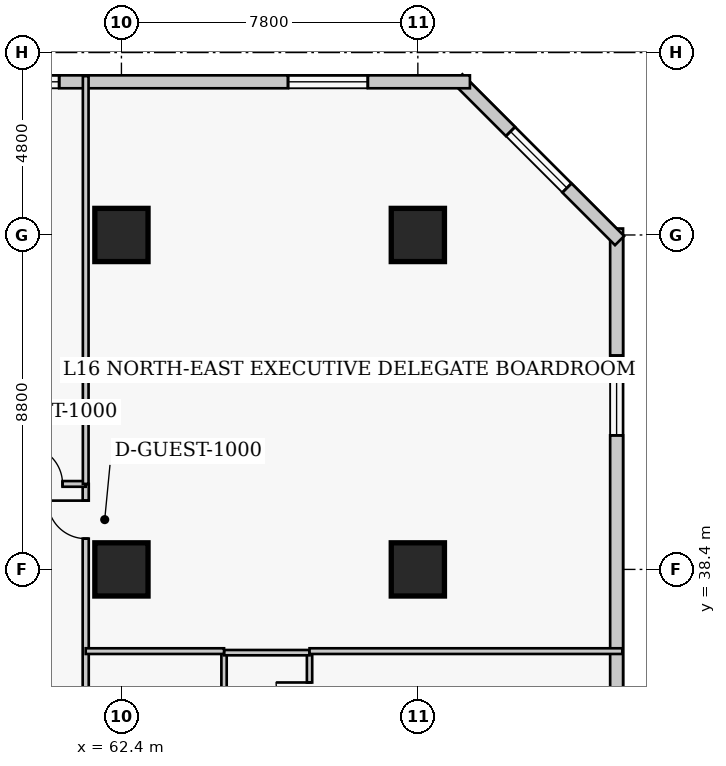
"""IFC4 building model, lengths in metres.
Left out: names, types, materials, properties, quantities, classifications, styles, units other than length and angle.
Written with IfcOpenShell. Run it as: python <this file> out.ifc"""

import sys

from ifc_helpers import new_model, si_unit, direction, frame, frame_2d, origin, origin_2d, place, context, subcontext, project, spatial, rectangle, extrude, element, fill, save


model = new_model("IFC4")
c1 = context("Model", 3, precision=1e-05, world=origin(), true_north=direction((0.0, 1.0)))
c2 = subcontext(c1, "Body", "Model", "MODEL_VIEW")
j1 = project(units=[si_unit("LENGTHUNIT", "METRE"), si_unit("PLANEANGLEUNIT", "RADIAN")], contexts=[c1])
p1 = place(None, origin())
s1 = spatial("IfcSite", under=j1, at=p1, CompositionType="ELEMENT")
p2 = place(p1, origin())
s2 = spatial("IfcBuilding", under=s1, at=p2, CompositionType="ELEMENT")
p3 = place(p2, frame((0.0, 0.0, 67.8)))
s3 = spatial("IfcBuildingStorey", under=s2, at=p3, CompositionType="ELEMENT", Elevation=67.8)
for number, where, z_axis, x_axis in (
    (1, (62.4, 38.4, 0.0), (0.0, 0.0, 1.0), (1.0, 0.0, 0.0)),
    (2, (62.4, 47.2, 0.0), (0.0, 0.0, 1.0), (1.0, 0.0, 0.0)),
    (3, (70.2, 38.4, 0.0), (0.0, 0.0, 1.0), (1.0, 0.0, 0.0)),
    (4, (70.2, 47.2, 0.0), (0.0, 0.0, 1.0), (1.0, 0.0, 0.0)),
):
    element("IfcColumn", number, at=place(p3, frame(where, z_axis=z_axis, x_axis=x_axis)), inside=s3, PredefinedType="COLUMN", context=c2, shape_type="SweptSolid", body=[
        extrude(rectangle(XDim=1.4, YDim=1.4, at=origin_2d()), origin(), (0.0, 0.0, 1.0), 3.8),
    ])
p4 = place(p3, frame((75.43, 12.23, 0.0), z_axis=(0.0, 0.0, 1.0), x_axis=(0.0, 1.0, 0.0)))
e5 = element("IfcWall", 5, at=p4, inside=s3, PredefinedType="SOLIDWALL", context=c2, shape_type="SweptSolid", body=[
    extrude(rectangle(XDim=35.14, YDim=0.34, at=frame_2d((17.57, 0.0))), origin(), (0.0, 0.0, 1.0), 3.54),
])
p5 = place(p4, frame((3.343, 0.0, 0.85)))
e6 = element("IfcOpeningElement", 6, at=p5, cuts=e5, PredefinedType="OPENING", context=c2, shape_type="SweptSolid", body=[
    extrude(rectangle(XDim=2.1, YDim=1.85, at=frame_2d((1.05, 0.925))), frame((0.0, 0.18, 0.0), z_axis=(0.0, -1.0, 0.0), x_axis=(1.0, 0.0, 0.0)), (0.0, 0.0, 1.0), 0.36),
])
p6 = place(p4, frame((12.127, 0.0, 0.85)))
e7 = element("IfcOpeningElement", 7, at=p6, cuts=e5, PredefinedType="OPENING", context=c2, shape_type="SweptSolid", body=[
    extrude(rectangle(XDim=2.1, YDim=1.85, at=frame_2d((1.05, 0.925))), frame((0.0, 0.18, 0.0), z_axis=(0.0, -1.0, 0.0), x_axis=(1.0, 0.0, 0.0)), (0.0, 0.0, 1.0), 0.36),
])
p7 = place(p4, frame((20.913, 0.0, 0.85)))
e8 = element("IfcOpeningElement", 8, at=p7, cuts=e5, PredefinedType="OPENING", context=c2, shape_type="SweptSolid", body=[
    extrude(rectangle(XDim=2.1, YDim=1.85, at=frame_2d((1.05, 0.925))), frame((0.0, 0.18, 0.0), z_axis=(0.0, -1.0, 0.0), x_axis=(1.0, 0.0, 0.0)), (0.0, 0.0, 1.0), 0.36),
])
p8 = place(p4, frame((29.698, 0.0, 0.85)))
e9 = element("IfcOpeningElement", 9, at=p8, cuts=e5, PredefinedType="OPENING", context=c2, shape_type="SweptSolid", body=[
    extrude(rectangle(XDim=2.1, YDim=1.85, at=frame_2d((1.05, 0.925))), frame((0.0, 0.18, 0.0), z_axis=(0.0, -1.0, 0.0), x_axis=(1.0, 0.0, 0.0)), (0.0, 0.0, 1.0), 0.36),
])
p9 = place(p3, frame((75.508, 47.052, 0.0), z_axis=(0.0, 0.0, 1.0), x_axis=(-0.707106781187, 0.707106781187, 0.0)))
e10 = element("IfcWall", 10, at=p9, inside=s3, PredefinedType="SOLIDWALL", context=c2, shape_type="SweptSolid", body=[
    extrude(rectangle(XDim=6.02, YDim=0.34, at=frame_2d((3.01, 0.0))), origin(), (0.0, 0.0, 1.0), 3.54),
])
p10 = place(p9, frame((1.96, 0.0, 0.85)))
e11 = element("IfcOpeningElement", 11, at=p10, cuts=e10, PredefinedType="OPENING", context=c2, shape_type="SweptSolid", body=[
    extrude(rectangle(XDim=2.1, YDim=1.85, at=frame_2d((1.05, 0.925))), frame((0.0, 0.18, 0.0), z_axis=(0.0, -1.0, 0.0), x_axis=(1.0, 0.0, 0.0)), (0.0, 0.0, 1.0), 0.36),
])
p11 = place(p3, frame((71.57, 51.23, 0.0), z_axis=(0.0, 0.0, 1.0), x_axis=(-1.0, 0.0, 0.0)))
e12 = element("IfcWall", 12, at=p11, inside=s3, PredefinedType="SOLIDWALL", context=c2, shape_type="SweptSolid", body=[
    extrude(rectangle(XDim=29.89, YDim=0.34, at=frame_2d((14.945, 0.0))), origin(), (0.0, 0.0, 1.0), 3.54),
])
p12 = place(p11, frame((2.686, 0.0, 0.85)))
e13 = element("IfcOpeningElement", 13, at=p12, cuts=e12, PredefinedType="OPENING", context=c2, shape_type="SweptSolid", body=[
    extrude(rectangle(XDim=2.1, YDim=1.85, at=frame_2d((1.05, 0.925))), frame((0.0, 0.18, 0.0), z_axis=(0.0, -1.0, 0.0), x_axis=(1.0, 0.0, 0.0)), (0.0, 0.0, 1.0), 0.36),
])
p13 = place(p11, frame((10.809, 0.0, 0.85)))
e14 = element("IfcOpeningElement", 14, at=p13, cuts=e12, PredefinedType="OPENING", context=c2, shape_type="SweptSolid", body=[
    extrude(rectangle(XDim=2.1, YDim=1.85, at=frame_2d((1.05, 0.925))), frame((0.0, 0.18, 0.0), z_axis=(0.0, -1.0, 0.0), x_axis=(1.0, 0.0, 0.0)), (0.0, 0.0, 1.0), 0.36),
])
p14 = place(p11, frame((17.631, 0.0, 0.85)))
e15 = element("IfcOpeningElement", 15, at=p14, cuts=e12, PredefinedType="OPENING", context=c2, shape_type="SweptSolid", body=[
    extrude(rectangle(XDim=2.1, YDim=1.85, at=frame_2d((1.05, 0.925))), frame((0.0, 0.18, 0.0), z_axis=(0.0, -1.0, 0.0), x_axis=(1.0, 0.0, 0.0)), (0.0, 0.0, 1.0), 0.36),
])
p15 = place(p11, frame((25.104, 0.0, 0.85)))
e16 = element("IfcOpeningElement", 16, at=p15, cuts=e12, PredefinedType="OPENING", context=c2, shape_type="SweptSolid", body=[
    extrude(rectangle(XDim=2.1, YDim=1.85, at=frame_2d((1.05, 0.925))), frame((0.0, 0.18, 0.0), z_axis=(0.0, -1.0, 0.0), x_axis=(1.0, 0.0, 0.0)), (0.0, 0.0, 1.0), 0.36),
])
p16 = place(p3, frame((61.46, 10.25, 0.0), z_axis=(0.0, 0.0, 1.0), x_axis=(0.0, 1.0, 0.0)))
e17 = element("IfcWall", 17, at=p16, inside=s3, PredefinedType="PARTITIONING", context=c2, shape_type="SweptSolid", body=[
    extrude(rectangle(XDim=30.4, YDim=0.16, at=frame_2d((15.2, 0.0))), origin(), (0.0, 0.0, 1.0), 3.54),
])
p17 = place(p16, frame((4.4, 0.0, 0.0)))
e18 = element("IfcOpeningElement", 18, at=p17, cuts=e17, PredefinedType="OPENING", context=c2, shape_type="SweptSolid", body=[
    extrude(rectangle(XDim=0.95, YDim=2.1, at=frame_2d((0.475, 1.05))), frame((0.0, 0.09, 0.0), z_axis=(0.0, -1.0, 0.0), x_axis=(1.0, 0.0, 0.0)), (0.0, 0.0, 1.0), 0.18),
])
p18 = place(p16, frame((13.337, 0.0, 0.0)))
e19 = element("IfcOpeningElement", 19, at=p18, cuts=e17, PredefinedType="OPENING", context=c2, shape_type="SweptSolid", body=[
    extrude(rectangle(XDim=0.95, YDim=2.1, at=frame_2d((0.475, 1.05))), frame((0.0, 0.09, 0.0), z_axis=(0.0, -1.0, 0.0), x_axis=(1.0, 0.0, 0.0)), (0.0, 0.0, 1.0), 0.18),
])
p19 = place(p16, frame((21.462, 0.0, 0.0)))
e20 = element("IfcOpeningElement", 20, at=p19, cuts=e17, PredefinedType="OPENING", context=c2, shape_type="SweptSolid", body=[
    extrude(rectangle(XDim=0.95, YDim=2.1, at=frame_2d((0.475, 1.05))), frame((0.0, 0.09, 0.0), z_axis=(0.0, -1.0, 0.0), x_axis=(1.0, 0.0, 0.0)), (0.0, 0.0, 1.0), 0.18),
])
p20 = place(p16, frame((28.96, 0.0, 0.0)))
e21 = element("IfcOpeningElement", 21, at=p20, cuts=e17, PredefinedType="OPENING", context=c2, shape_type="SweptSolid", body=[
    extrude(rectangle(XDim=1.0, YDim=2.15, at=frame_2d((0.5, 1.075))), frame((0.0, 0.09, 0.0), z_axis=(0.0, -1.0, 0.0), x_axis=(1.0, 0.0, 0.0)), (0.0, 0.0, 1.0), 0.18),
])
p21 = place(p3, frame((56.8, 40.65, 0.0), z_axis=(0.0, 0.0, 1.0), x_axis=(1.0, 0.0, 0.0)))
e22 = element("IfcWall", 22, at=p21, inside=s3, PredefinedType="PARTITIONING", context=c2, shape_type="SweptSolid", body=[
    extrude(rectangle(XDim=4.66, YDim=0.15, at=frame_2d((2.33, 0.0))), origin(), (0.0, 0.0, 1.0), 3.54),
])
p22 = place(p21, frame((3.05, 0.0, 0.0)))
e23 = element("IfcOpeningElement", 23, at=p22, cuts=e22, PredefinedType="OPENING", context=c2, shape_type="SweptSolid", body=[
    extrude(rectangle(XDim=1.0, YDim=2.15, at=frame_2d((0.5, 1.075))), frame((0.0, 0.085, 0.0), z_axis=(0.0, -1.0, 0.0), x_axis=(1.0, 0.0, 0.0)), (0.0, 0.0, 1.0), 0.17),
])
p23 = place(p3, frame((61.46, 40.65, 0.0), z_axis=(0.0, 0.0, 1.0), x_axis=(0.0, 1.0, 0.0)))
e24 = element("IfcWall", 24, at=p23, inside=s3, PredefinedType="PARTITIONING", context=c2, shape_type="SweptSolid", body=[
    extrude(rectangle(XDim=10.73, YDim=0.15, at=frame_2d((5.365, 0.0))), origin(), (0.0, 0.0, 1.0), 3.54),
])
p24 = place(p3, frame((65.1, 33.76, 0.0), z_axis=(0.0, 0.0, 1.0), x_axis=(0.0, 1.0, 0.0)))
e25 = element("IfcWall", 25, at=p24, inside=s3, PredefinedType="PLUMBINGWALL", context=c2, shape_type="SweptSolid", body=[
    extrude(rectangle(XDim=2.45, YDim=0.14, at=frame_2d((1.225, 0.0))), origin(), (0.0, 0.0, 1.0), 3.54),
])
p25 = place(p3, frame((67.35, 33.76, 0.0), z_axis=(0.0, 0.0, 1.0), x_axis=(0.0, 1.0, 0.0)))
e26 = element("IfcWall", 26, at=p25, inside=s3, PredefinedType="PLUMBINGWALL", context=c2, shape_type="SweptSolid", body=[
    extrude(rectangle(XDim=2.45, YDim=0.14, at=frame_2d((1.225, 0.0))), origin(), (0.0, 0.0, 1.0), 3.54),
])
p26 = place(p25, frame((0.785, 0.0, 0.0)))
e27 = element("IfcOpeningElement", 27, at=p26, cuts=e26, PredefinedType="OPENING", context=c2, shape_type="SweptSolid", body=[
    extrude(rectangle(XDim=0.88, YDim=2.05, at=frame_2d((0.44, 1.025))), frame((0.0, 0.08, 0.0), z_axis=(0.0, -1.0, 0.0), x_axis=(1.0, 0.0, 0.0)), (0.0, 0.0, 1.0), 0.16),
])
p27 = place(p3, frame((65.1, 36.21, 0.0), z_axis=(0.0, 0.0, 1.0), x_axis=(1.0, 0.0, 0.0)))
e28 = element("IfcWall", 28, at=p27, inside=s3, PredefinedType="PLUMBINGWALL", context=c2, shape_type="SweptSolid", body=[
    extrude(rectangle(XDim=2.25, YDim=0.14, at=frame_2d((1.125, 0.0))), origin(), (0.0, 0.0, 1.0), 3.54),
])
p28 = place(p3, frame((61.46, 36.25, 0.0), z_axis=(0.0, 0.0, 1.0), x_axis=(1.0, 0.0, 0.0)))
e29 = element("IfcWall", 29, at=p28, inside=s3, PredefinedType="PARTITIONING", context=c2, shape_type="SweptSolid", body=[
    extrude(rectangle(XDim=3.64, YDim=0.15, at=frame_2d((1.82, 0.0))), origin(), (0.0, 0.0, 1.0), 3.54),
])
p29 = place(p3, frame((67.35, 36.25, 0.0), z_axis=(0.0, 0.0, 1.0), x_axis=(1.0, 0.0, 0.0)))
e30 = element("IfcWall", 30, at=p29, inside=s3, PredefinedType="PARTITIONING", context=c2, shape_type="SweptSolid", body=[
    extrude(rectangle(XDim=8.23, YDim=0.15, at=frame_2d((4.115, 0.0))), origin(), (0.0, 0.0, 1.0), 3.54),
])
p30 = place(p8, origin())
e31 = element("IfcWindow", 31, at=p30, inside=s3, PartitioningType="SINGLE_PANEL", PredefinedType="WINDOW", context=c2, shape_type="SweptSolid", body=[
    extrude(rectangle(XDim=2.1, YDim=1.85, at=frame_2d((1.05, 0.925))), frame((0.0, 0.03, 0.0), z_axis=(0.0, -1.0, 0.0), x_axis=(1.0, 0.0, 0.0)), (0.0, 0.0, 1.0), 0.06),
])
fill(e9, e31)
p31 = place(p10, origin())
e32 = element("IfcWindow", 32, at=p31, inside=s3, PartitioningType="SINGLE_PANEL", PredefinedType="WINDOW", context=c2, shape_type="SweptSolid", body=[
    extrude(rectangle(XDim=2.1, YDim=1.85, at=frame_2d((1.05, 0.925))), frame((0.0, 0.03, 0.0), z_axis=(0.0, -1.0, 0.0), x_axis=(1.0, 0.0, 0.0)), (0.0, 0.0, 1.0), 0.06),
])
fill(e11, e32)
p32 = place(p12, origin())
e33 = element("IfcWindow", 33, at=p32, inside=s3, PartitioningType="SINGLE_PANEL", PredefinedType="WINDOW", context=c2, shape_type="SweptSolid", body=[
    extrude(rectangle(XDim=2.1, YDim=1.85, at=frame_2d((1.05, 0.925))), frame((0.0, 0.03, 0.0), z_axis=(0.0, -1.0, 0.0), x_axis=(1.0, 0.0, 0.0)), (0.0, 0.0, 1.0), 0.06),
])
fill(e13, e33)
p33 = place(p13, origin())
e34 = element("IfcWindow", 34, at=p33, inside=s3, PartitioningType="SINGLE_PANEL", PredefinedType="WINDOW", context=c2, shape_type="SweptSolid", body=[
    extrude(rectangle(XDim=2.1, YDim=1.85, at=frame_2d((1.05, 0.925))), frame((0.0, 0.03, 0.0), z_axis=(0.0, -1.0, 0.0), x_axis=(1.0, 0.0, 0.0)), (0.0, 0.0, 1.0), 0.06),
])
fill(e14, e34)
p34 = place(p22, origin())
e35 = element("IfcDoor", 35, at=p34, inside=s3, OperationType="SINGLE_SWING_LEFT", PredefinedType="DOOR", context=c2, shape_type="SweptSolid", body=[
    extrude(rectangle(XDim=1.0, YDim=2.15, at=frame_2d((0.5, 1.075))), frame((0.0, 0.025, 0.0), z_axis=(0.0, -1.0, 0.0), x_axis=(1.0, 0.0, 0.0)), (0.0, 0.0, 1.0), 0.05),
])
fill(e23, e35)
p35 = place(p26, origin())
e36 = element("IfcDoor", 36, at=p35, inside=s3, OperationType="SINGLE_SWING_RIGHT", PredefinedType="DOOR", context=c2, shape_type="SweptSolid", body=[
    extrude(rectangle(XDim=0.88, YDim=2.05, at=frame_2d((0.44, 1.025))), frame((0.0, 0.025, 0.0), z_axis=(0.0, -1.0, 0.0), x_axis=(1.0, 0.0, 0.0)), (0.0, 0.0, 1.0), 0.05),
])
fill(e27, e36)
p36 = place(p20, origin())
e37 = element("IfcDoor", 37, at=p36, inside=s3, OperationType="SINGLE_SWING_RIGHT", PredefinedType="DOOR", context=c2, shape_type="SweptSolid", body=[
    extrude(rectangle(XDim=1.0, YDim=2.15, at=frame_2d((0.5, 1.075))), frame((0.0, 0.025, 0.0), z_axis=(0.0, -1.0, 0.0), x_axis=(1.0, 0.0, 0.0)), (0.0, 0.0, 1.0), 0.05),
])
fill(e21, e37)
save(model, sys.argv[1])
